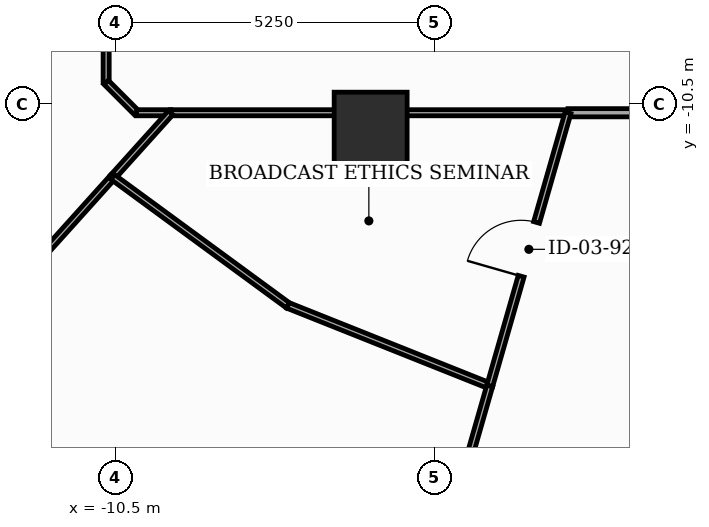
"""IFC4 building model, lengths in metres.
Left out: names, types, materials, properties, quantities, classifications, styles, units other than length and angle.
Written with IfcOpenShell. Run it as: python <this file> out.ifc"""

import sys

from ifc_helpers import new_model, si_unit, direction, frame, frame_2d, origin, origin_2d, place, context, subcontext, project, spatial, rectangle, extrude, element, fill, save


model = new_model("IFC4")
c1 = context("Model", 3, precision=1e-05, world=origin(), true_north=direction((0.0, 1.0)))
c2 = subcontext(c1, "Body", "Model", "MODEL_VIEW")
j1 = project(units=[si_unit("LENGTHUNIT", "METRE"), si_unit("PLANEANGLEUNIT", "RADIAN")], contexts=[c1])
p1 = place(None, origin())
s1 = spatial("IfcSite", under=j1, at=p1, CompositionType="ELEMENT")
p2 = place(p1, origin())
s2 = spatial("IfcBuilding", under=s1, at=p2, CompositionType="ELEMENT")
p3 = place(p2, frame((0.0, 0.0, 169.4)))
s3 = spatial("IfcBuildingStorey", under=s2, at=p3, CompositionType="ELEMENT", Elevation=169.4)
p4 = place(p3, frame((-6.3, -10.912, 0.0), z_axis=(0.0, 0.0, 1.0), x_axis=(1.0, 0.0, 0.0)))
e1 = element("IfcColumn", 1, at=p4, inside=s3, PredefinedType="COLUMN", context=c2, shape_type="SweptSolid", body=[
    extrude(rectangle(XDim=1.2, YDim=1.2, at=origin_2d()), origin(), (0.0, 0.0, 1.0), 3.7),
])
p5 = place(p3, frame((-10.65, -4.85, 0.0), z_axis=(0.0, 0.0, 1.0), x_axis=(0.0, -1.0, 0.0)))
e2 = element("IfcWall", 2, at=p5, inside=s3, PredefinedType="MOVABLE", context=c2, shape_type="SweptSolid", body=[
    extrude(rectangle(XDim=5.3, YDim=0.1, at=frame_2d((2.65, 0.0))), origin(), (0.0, 0.0, 1.0), 2.885),
])
p6 = place(p5, frame((3.78, 0.0, 0.0)))
e3 = element("IfcOpeningElement", 3, at=p6, cuts=e2, PredefinedType="OPENING", context=c2, shape_type="SweptSolid", body=[
    extrude(rectangle(XDim=0.92, YDim=2.1, at=frame_2d((0.46, 1.05))), frame((0.0, 0.06, 0.0), z_axis=(0.0, -1.0, 0.0), x_axis=(1.0, 0.0, 0.0)), (0.0, 0.0, 1.0), 0.12),
])
p7 = place(p3, frame((-10.65, -10.15, 0.0), z_axis=(0.0, 0.0, 1.0), x_axis=(0.707106781187, -0.707106781187, 0.0)))
e4 = element("IfcWall", 4, at=p7, inside=s3, PredefinedType="MOVABLE", context=c2, shape_type="SweptSolid", body=[
    extrude(rectangle(XDim=0.707, YDim=0.1, at=frame_2d((0.354, 0.0))), origin(), (0.0, 0.0, 1.0), 3.5),
])
p8 = place(p3, frame((-10.15, -10.65, 0.0), z_axis=(0.0, 0.0, 1.0), x_axis=(1.0, 0.0, 0.0)))
e5 = element("IfcWall", 5, at=p8, inside=s3, PredefinedType="MOVABLE", context=c2, shape_type="SweptSolid", body=[
    extrude(rectangle(XDim=0.561, YDim=0.1, at=frame_2d((0.28, 0.0))), origin(), (0.0, 0.0, 1.0), 3.5),
])
p9 = place(p3, frame((-9.589, -10.65, 0.0), z_axis=(0.0, 0.0, 1.0), x_axis=(1.0, 0.0, 0.0)))
e6 = element("IfcWall", 6, at=p9, inside=s3, PredefinedType="MOVABLE", context=c2, shape_type="SweptSolid", body=[
    extrude(rectangle(XDim=6.535, YDim=0.1, at=frame_2d((3.268, 0.0))), origin(), (0.0, 0.0, 1.0), 2.885),
])
p10 = place(p3, frame((-3.054, -10.65, 0.0), z_axis=(0.0, 0.0, 1.0), x_axis=(1.0, 0.0, 0.0)))
e7 = element("IfcWall", 7, at=p10, inside=s3, PredefinedType="PARTITIONING", context=c2, shape_type="SweptSolid", body=[
    extrude(rectangle(XDim=10.792, YDim=0.135, at=frame_2d((5.396, 0.0))), origin(), (0.0, 0.0, 1.0), 2.885),
])
p11 = place(p10, frame((4.596, 0.0, 0.0)))
e8 = element("IfcOpeningElement", 8, at=p11, cuts=e7, PredefinedType="OPENING", context=c2, shape_type="SweptSolid", body=[
    extrude(rectangle(XDim=1.6, YDim=2.15, at=frame_2d((0.8, 1.075))), frame((0.0, 0.077, 0.0), z_axis=(0.0, -1.0, 0.0), x_axis=(1.0, 0.0, 0.0)), (0.0, 0.0, 1.0), 0.155),
])
p12 = place(p3, frame((-10.541, -11.707, 0.0), z_axis=(0.0, 0.0, 1.0), x_axis=(0.669154347467, 0.743123448201, 0.0)))
e9 = element("IfcWall", 9, at=p12, inside=s3, PredefinedType="MOVABLE", context=c2, shape_type="SweptSolid", body=[
    extrude(rectangle(XDim=1.423, YDim=0.1, at=frame_2d((0.711, 0.0))), origin(), (0.0, 0.0, 1.0), 3.5),
])
p13 = place(p3, frame((-15.528, -17.245, 0.0), z_axis=(0.0, 0.0, 1.0), x_axis=(0.669169234172, 0.74311004302, 0.0)))
e10 = element("IfcWall", 10, at=p13, inside=s3, PredefinedType="MOVABLE", context=c2, shape_type="SweptSolid", body=[
    extrude(rectangle(XDim=7.452, YDim=0.1, at=frame_2d((3.726, 0.0))), origin(), (0.0, 0.0, 1.0), 2.885),
])
p14 = place(p3, frame((-10.541, -11.707, 0.0), z_axis=(0.0, 0.0, 1.0), x_axis=(0.806504929698, -0.591227366055, 0.0)))
e11 = element("IfcWall", 11, at=p14, inside=s3, PredefinedType="MOVABLE", context=c2, shape_type="SweptSolid", body=[
    extrude(rectangle(XDim=3.572, YDim=0.1, at=frame_2d((1.786, 0.0))), origin(), (0.0, 0.0, 1.0), 2.885),
])
p15 = place(p3, frame((-7.66, -13.819, 0.0), z_axis=(0.0, 0.0, 1.0), x_axis=(0.928782740603, -0.37062463593, 0.0)))
e12 = element("IfcWall", 12, at=p15, inside=s3, PredefinedType="MOVABLE", context=c2, shape_type="SweptSolid", body=[
    extrude(rectangle(XDim=3.572, YDim=0.1, at=frame_2d((1.786, 0.0))), origin(), (0.0, 0.0, 1.0), 3.5),
])
p16 = place(p3, frame((-4.342, -15.143, 0.0), z_axis=(0.0, 0.0, 1.0), x_axis=(0.275576442642, 0.961279160422, 0.0)))
e13 = element("IfcWall", 13, at=p16, inside=s3, PredefinedType="MOVABLE", context=c2, shape_type="SweptSolid", body=[
    extrude(rectangle(XDim=4.674, YDim=0.1, at=frame_2d((2.337, 0.0))), origin(), (0.0, 0.0, 1.0), 2.885),
])
p17 = place(p16, frame((1.877, 0.0, 0.0)))
e14 = element("IfcOpeningElement", 14, at=p17, cuts=e13, PredefinedType="OPENING", context=c2, shape_type="SweptSolid", body=[
    extrude(rectangle(XDim=0.92, YDim=2.1, at=frame_2d((0.46, 1.05))), frame((0.0, 0.06, 0.0), z_axis=(0.0, -1.0, 0.0), x_axis=(1.0, 0.0, 0.0)), (0.0, 0.0, 1.0), 0.12),
])
p18 = place(p3, frame((-7.721, -26.926, 0.0), z_axis=(0.0, 0.0, 1.0), x_axis=(0.275633812082, 0.961262712081, 0.0)))
e15 = element("IfcWall", 15, at=p18, inside=s3, PredefinedType="MOVABLE", context=c2, shape_type="SweptSolid", body=[
    extrude(rectangle(XDim=12.258, YDim=0.1, at=frame_2d((6.129, 0.0))), origin(), (0.0, 0.0, 1.0), 2.985),
])
p19 = place(p18, frame((5.669, 0.0, 0.0)))
e16 = element("IfcOpeningElement", 16, at=p19, cuts=e15, PredefinedType="OPENING", context=c2, shape_type="SweptSolid", body=[
    extrude(rectangle(XDim=0.92, YDim=2.1, at=frame_2d((0.46, 1.05))), frame((0.0, 0.06, 0.0), z_axis=(0.0, -1.0, 0.0), x_axis=(1.0, 0.0, 0.0)), (0.0, 0.0, 1.0), 0.12),
])
p20 = place(p17, origin())
e17 = element("IfcDoor", 17, at=p20, inside=s3, OperationType="SINGLE_SWING_LEFT", PredefinedType="DOOR", context=c2, shape_type="SweptSolid", body=[
    extrude(rectangle(XDim=0.92, YDim=2.1, at=frame_2d((0.46, 1.05))), frame((0.0, 0.025, 0.0), z_axis=(0.0, -1.0, 0.0), x_axis=(1.0, 0.0, 0.0)), (0.0, 0.0, 1.0), 0.05),
])
fill(e14, e17)
save(model, sys.argv[1])
